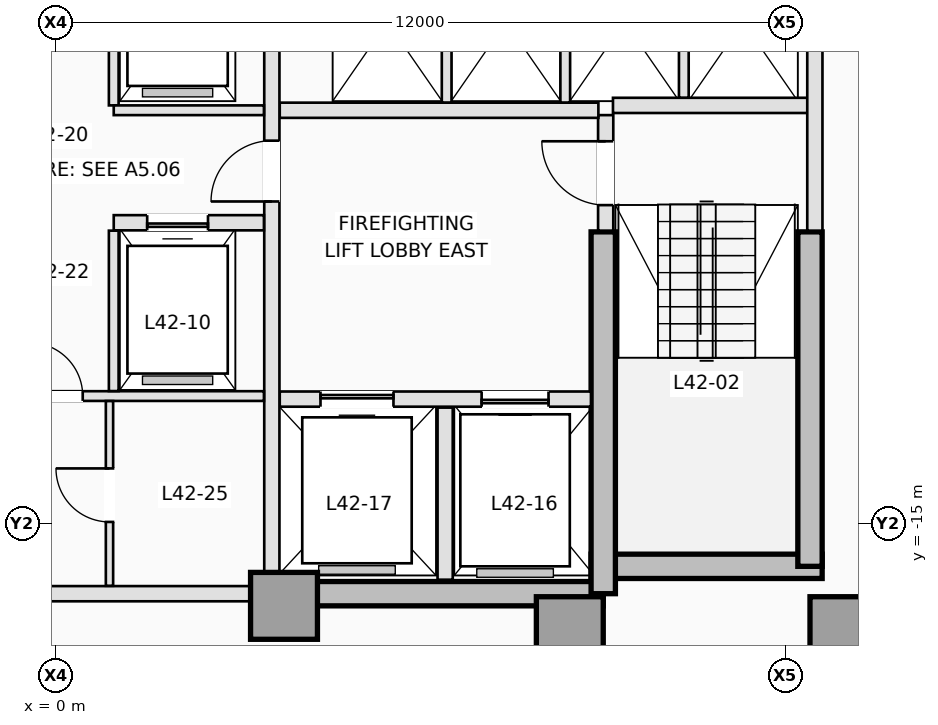
"""IFC4 building model, lengths in metres.
Left out: names, types, materials, properties, quantities, classifications, styles, units other than length and angle.
Written with IfcOpenShell. Run it as: python <this file> out.ifc"""

import sys

from ifc_helpers import new_model, si_unit, direction, frame, frame_2d, origin, origin_2d, place, context, subcontext, project, spatial, rectangle, extrude, element, fill, save


model = new_model("IFC4")
c1 = context("Model", 3, precision=1e-05, world=origin(), true_north=direction((0.0, 1.0)))
c2 = subcontext(c1, "Body", "Model", "MODEL_VIEW")
j1 = project(units=[si_unit("LENGTHUNIT", "METRE"), si_unit("PLANEANGLEUNIT", "RADIAN")], contexts=[c1])
p1 = place(None, origin())
s1 = spatial("IfcSite", under=j1, at=p1, CompositionType="ELEMENT")
p2 = place(p1, origin())
s2 = spatial("IfcBuilding", under=s1, at=p2, CompositionType="ELEMENT")
p3 = place(p2, frame((0.0, 0.0, 154.5)))
s3 = spatial("IfcBuildingStorey", under=s2, at=p3, CompositionType="ELEMENT", Elevation=154.5)
p4 = place(p3, frame((3.75, -16.15, 0.0), z_axis=(0.0, 0.0, 1.0), x_axis=(1.0, 0.0, 0.0)))
e1 = element("IfcWall", 1, at=p4, inside=s3, PredefinedType="SHEAR", context=c2, shape_type="SweptSolid", body=[
    extrude(rectangle(XDim=5.25, YDim=0.4, at=frame_2d((2.625, 0.0))), origin(), (0.0, 0.0, 1.0), 3.5),
])
p5 = place(p3, frame((8.8, -15.7, 0.0), z_axis=(0.0, 0.0, 1.0), x_axis=(1.0, 0.0, 0.0)))
e2 = element("IfcWall", 2, at=p5, inside=s3, PredefinedType="SHEAR", context=c2, shape_type="SweptSolid", body=[
    extrude(rectangle(XDim=3.8, YDim=0.4, at=frame_2d((1.9, 0.0))), origin(), (0.0, 0.0, 1.0), 3.5),
])
p6 = place(p3, frame((12.4, -15.7, 0.0), z_axis=(0.0, 0.0, 1.0), x_axis=(0.0, 1.0, 0.0)))
e3 = element("IfcWall", 3, at=p6, inside=s3, PredefinedType="SHEAR", context=c2, shape_type="SweptSolid", body=[
    extrude(rectangle(XDim=5.5, YDim=0.4, at=frame_2d((2.75, 0.0))), origin(), (0.0, 0.0, 1.0), 3.5),
])
p7 = place(p3, frame((9.0, -16.15, 0.0), z_axis=(0.0, 0.0, 1.0), x_axis=(0.0, 1.0, 0.0)))
e4 = element("IfcWall", 4, at=p7, inside=s3, PredefinedType="SHEAR", context=c2, shape_type="SweptSolid", body=[
    extrude(rectangle(XDim=5.95, YDim=0.4, at=frame_2d((2.975, 0.0))), origin(), (0.0, 0.0, 1.0), 3.5),
])
for number, where, z_axis, x_axis in (
    (5, (3.75, -16.35, 0.0), (0.0, 0.0, 1.0), (1.0, 0.0, 0.0)),
    (6, (8.45, -16.75, 0.0), (0.0, 0.0, 1.0), (1.0, 0.0, 0.0)),
    (7, (12.95, -16.75, 0.0), (0.0, 0.0, 1.0), (1.0, 0.0, 0.0)),
):
    element("IfcColumn", number, at=place(p3, frame(where, z_axis=z_axis, x_axis=x_axis)), inside=s3, PredefinedType="COLUMN", context=c2, shape_type="SweptSolid", body=[
        extrude(rectangle(XDim=1.1, YDim=1.1, at=origin_2d()), origin(), (0.0, 0.0, 1.0), 3.5),
    ])
p8 = place(p3, frame((9.04, -10.18, 0.0), z_axis=(0.0, 0.0, 1.0), x_axis=(0.0, 1.0, 0.0)))
e8 = element("IfcWall", 8, at=p8, inside=s3, PredefinedType="PARTITIONING", context=c2, shape_type="SweptSolid", body=[
    extrude(rectangle(XDim=1.9, YDim=0.25, at=frame_2d((0.95, 0.0))), origin(), (0.0, 0.0, 1.0), 3.25),
])
p9 = place(p8, frame((0.42, 0.0, 0.0)))
e9 = element("IfcOpeningElement", 9, at=p9, cuts=e8, PredefinedType="OPENING", context=c2, shape_type="SweptSolid", body=[
    extrude(rectangle(XDim=1.05, YDim=2.15, at=frame_2d((0.525, 1.075))), frame((0.0, 0.135, 0.0), z_axis=(0.0, -1.0, 0.0), x_axis=(1.0, 0.0, 0.0)), (0.0, 0.0, 1.0), 0.27),
])
p10 = place(p3, frame((9.16, -8.12, 0.0), z_axis=(0.0, 0.0, 1.0), x_axis=(1.0, 0.0, 0.0)))
e10 = element("IfcWall", 10, at=p10, inside=s3, PredefinedType="PARTITIONING", context=c2, shape_type="SweptSolid", body=[
    extrude(rectangle(XDim=3.22, YDim=0.25, at=frame_2d((1.61, 0.0))), origin(), (0.0, 0.0, 1.0), 3.25),
])
p11 = place(p3, frame((12.48, -10.18, 0.0), z_axis=(0.0, 0.0, 1.0), x_axis=(0.0, 1.0, 0.0)))
e11 = element("IfcWall", 11, at=p11, inside=s3, PredefinedType="PARTITIONING", context=c2, shape_type="SweptSolid", body=[
    extrude(rectangle(XDim=4.828, YDim=0.25, at=frame_2d((2.414, 0.0))), origin(), (0.0, 0.0, 1.0), 3.25),
])
p12 = place(p3, frame((3.68, -12.95, 0.0), z_axis=(0.0, 0.0, 1.0), x_axis=(1.0, 0.0, 0.0)))
e12 = element("IfcWall", 12, at=p12, inside=s3, PredefinedType="PARTITIONING", context=c2, shape_type="SweptSolid", body=[
    extrude(rectangle(XDim=5.118, YDim=0.25, at=frame_2d((2.559, 0.0))), origin(), (0.0, 0.0, 1.0), 3.25),
])
p13 = place(p12, frame((3.32, 0.0, 0.0)))
e13 = element("IfcOpeningElement", 13, at=p13, cuts=e12, PredefinedType="OPENING", context=c2, shape_type="SweptSolid", body=[
    extrude(rectangle(XDim=1.1, YDim=2.15, at=frame_2d((0.55, 1.075))), frame((0.0, 0.135, 0.0), z_axis=(0.0, -1.0, 0.0), x_axis=(1.0, 0.0, 0.0)), (0.0, 0.0, 1.0), 0.27),
])
p14 = place(p12, frame((0.67, 0.0, 0.0)))
e14 = element("IfcOpeningElement", 14, at=p14, cuts=e12, PredefinedType="OPENING", context=c2, shape_type="SweptSolid", body=[
    extrude(rectangle(XDim=1.2, YDim=2.15, at=frame_2d((0.6, 1.075))), frame((0.0, 0.135, 0.0), z_axis=(0.0, -1.0, 0.0), x_axis=(1.0, 0.0, 0.0)), (0.0, 0.0, 1.0), 0.27),
])
p15 = place(p3, frame((6.4, -15.92, 0.0), z_axis=(0.0, 0.0, 1.0), x_axis=(0.0, 1.0, 0.0)))
e15 = element("IfcWall", 15, at=p15, inside=s3, PredefinedType="PARTITIONING", context=c2, shape_type="SweptSolid", body=[
    extrude(rectangle(XDim=2.83, YDim=0.25, at=frame_2d((1.415, 0.0))), origin(), (0.0, 0.0, 1.0), 3.25),
])
p16 = place(p3, frame((3.68, -8.2, 0.0), z_axis=(0.0, 0.0, 1.0), x_axis=(1.0, 0.0, 0.0)))
e16 = element("IfcWall", 16, at=p16, inside=s3, PredefinedType="PARTITIONING", context=c2, shape_type="SweptSolid", body=[
    extrude(rectangle(XDim=5.24, YDim=0.25, at=frame_2d((2.62, 0.0))), origin(), (0.0, 0.0, 1.0), 3.25),
])
p17 = place(p3, frame((3.55, -15.798, 0.0), z_axis=(0.0, 0.0, 1.0), x_axis=(0.0, 1.0, 0.0)))
e17 = element("IfcWall", 17, at=p17, inside=s3, PredefinedType="PARTITIONING", context=c2, shape_type="SweptSolid", body=[
    extrude(rectangle(XDim=10.446, YDim=0.25, at=frame_2d((5.223, 0.0))), origin(), (0.0, 0.0, 1.0), 3.25),
])
p18 = place(p17, frame((6.098, 0.0, 0.0)))
e18 = element("IfcOpeningElement", 18, at=p18, cuts=e17, PredefinedType="OPENING", context=c2, shape_type="SweptSolid", body=[
    extrude(rectangle(XDim=1.0, YDim=2.15, at=frame_2d((0.5, 1.075))), frame((0.0, 0.135, 0.0), z_axis=(0.0, -1.0, 0.0), x_axis=(1.0, 0.0, 0.0)), (0.0, 0.0, 1.0), 0.27),
])
for number, where, z_axis, x_axis in (
    (19, (6.425, -8.073, 0.0), (0.0, 0.0, 1.0), (0.0, 1.0, 0.0)),
    (20, (8.375, -8.073, 0.0), (0.0, 0.0, 1.0), (0.0, 1.0, 0.0)),
):
    element("IfcWall", number, at=place(p3, frame(where, z_axis=z_axis, x_axis=x_axis)), inside=s3, PredefinedType="PARTITIONING", context=c2, shape_type="SweptSolid", body=[
        extrude(rectangle(XDim=2.733, YDim=0.16, at=frame_2d((1.366, 0.0))), origin(), (0.0, 0.0, 1.0), 3.25),
    ])
p19 = place(p3, frame((10.325, -7.993, 0.0), z_axis=(0.0, 0.0, 1.0), x_axis=(0.0, 1.0, 0.0)))
e21 = element("IfcWall", 21, at=p19, inside=s3, PredefinedType="PARTITIONING", context=c2, shape_type="SweptSolid", body=[
    extrude(rectangle(XDim=2.653, YDim=0.16, at=frame_2d((1.326, 0.0))), origin(), (0.0, 0.0, 1.0), 3.25),
])
p20 = place(p3, frame((-3.198, -16.15, 0.0), z_axis=(0.0, 0.0, 1.0), x_axis=(1.0, 0.0, 0.0)))
e22 = element("IfcWall", 22, at=p20, inside=s3, PredefinedType="PARTITIONING", context=c2, shape_type="SweptSolid", body=[
    extrude(rectangle(XDim=6.396, YDim=0.25, at=frame_2d((3.198, 0.0))), origin(), (0.0, 0.0, 1.0), 2.45),
])
p21 = place(p3, frame((0.95, -8.12, 0.0), z_axis=(0.0, 0.0, 1.0), x_axis=(0.0, 1.0, 0.0)))
e23 = element("IfcWall", 23, at=p21, inside=s3, PredefinedType="PARTITIONING", context=c2, shape_type="SweptSolid", body=[
    extrude(rectangle(XDim=2.78, YDim=0.16, at=frame_2d((1.39, 0.0))), origin(), (0.0, 0.0, 1.0), 3.25),
])
p22 = place(p3, frame((0.95, -8.2, 0.0), z_axis=(0.0, 0.0, 1.0), x_axis=(1.0, 0.0, 0.0)))
e24 = element("IfcWall", 24, at=p22, inside=s3, PredefinedType="PARTITIONING", context=c2, shape_type="SweptSolid", body=[
    extrude(rectangle(XDim=2.47, YDim=0.16, at=frame_2d((1.235, 0.0))), origin(), (0.0, 0.0, 1.0), 3.25),
])
p23 = place(p3, frame((0.95, -10.05, 0.0), z_axis=(0.0, 0.0, 1.0), x_axis=(1.0, 0.0, 0.0)))
e25 = element("IfcWall", 25, at=p23, inside=s3, PredefinedType="PARTITIONING", context=c2, shape_type="SweptSolid", body=[
    extrude(rectangle(XDim=2.47, YDim=0.25, at=frame_2d((1.235, 0.0))), origin(), (0.0, 0.0, 1.0), 3.25),
])
p24 = place(p23, frame((0.55, 0.0, 0.0)))
e26 = element("IfcOpeningElement", 26, at=p24, cuts=e25, PredefinedType="OPENING", context=c2, shape_type="SweptSolid", body=[
    extrude(rectangle(XDim=1.0, YDim=2.15, at=frame_2d((0.5, 1.075))), frame((0.0, 0.135, 0.0), z_axis=(0.0, -1.0, 0.0), x_axis=(1.0, 0.0, 0.0)), (0.0, 0.0, 1.0), 0.27),
])
p25 = place(p3, frame((-3.42, -12.9, 0.0), z_axis=(0.0, 0.0, 1.0), x_axis=(1.0, 0.0, 0.0)))
e27 = element("IfcWall", 27, at=p25, inside=s3, PredefinedType="PARTITIONING", context=c2, shape_type="SweptSolid", body=[
    extrude(rectangle(XDim=6.84, YDim=0.16, at=frame_2d((3.42, 0.0))), origin(), (0.0, 0.0, 1.0), 3.25),
])
p26 = place(p25, frame((2.98, 0.0, 0.0)))
e28 = element("IfcOpeningElement", 28, at=p26, cuts=e27, PredefinedType="OPENING", context=c2, shape_type="SweptSolid", body=[
    extrude(rectangle(XDim=0.88, YDim=2.12, at=frame_2d((0.44, 1.06))), frame((0.0, 0.09, 0.0), z_axis=(0.0, -1.0, 0.0), x_axis=(1.0, 0.0, 0.0)), (0.0, 0.0, 1.0), 0.18),
])
p27 = place(p3, frame((0.95, -12.818, 0.0), z_axis=(0.0, 0.0, 1.0), x_axis=(0.0, 1.0, 0.0)))
e29 = element("IfcWall", 29, at=p27, inside=s3, PredefinedType="PARTITIONING", context=c2, shape_type="SweptSolid", body=[
    extrude(rectangle(XDim=2.638, YDim=0.16, at=frame_2d((1.319, 0.0))), origin(), (0.0, 0.0, 1.0), 3.25),
])
p28 = place(p3, frame((0.88, -16.02, 0.0), z_axis=(0.0, 0.0, 1.0), x_axis=(0.0, 1.0, 0.0)))
e30 = element("IfcWall", 30, at=p28, inside=s3, PredefinedType="PARTITIONING", context=c2, shape_type="SweptSolid", body=[
    extrude(rectangle(XDim=3.038, YDim=0.12, at=frame_2d((1.519, 0.0))), origin(), (0.0, 0.0, 1.0), 3.25),
])
p29 = place(p28, frame((1.05, 0.0, 0.0)))
e31 = element("IfcOpeningElement", 31, at=p29, cuts=e30, PredefinedType="OPENING", context=c2, shape_type="SweptSolid", body=[
    extrude(rectangle(XDim=0.88, YDim=2.12, at=frame_2d((0.44, 1.06))), frame((0.0, 0.07, 0.0), z_axis=(0.0, -1.0, 0.0), x_axis=(1.0, 0.0, 0.0)), (0.0, 0.0, 1.0), 0.14),
])
p30 = place(p13, origin())
e32 = element("IfcDoor", 32, at=p30, inside=s3, OperationType="SLIDING_TO_RIGHT", PredefinedType="DOOR", context=c2, shape_type="SweptSolid", body=[
    extrude(rectangle(XDim=1.1, YDim=2.15, at=frame_2d((0.55, 1.075))), frame((0.0, 0.025, 0.0), z_axis=(0.0, -1.0, 0.0), x_axis=(1.0, 0.0, 0.0)), (0.0, 0.0, 1.0), 0.05),
])
fill(e13, e32)
p31 = place(p14, origin())
e33 = element("IfcDoor", 33, at=p31, inside=s3, OperationType="SLIDING_TO_LEFT", PredefinedType="DOOR", context=c2, shape_type="SweptSolid", body=[
    extrude(rectangle(XDim=1.2, YDim=2.15, at=frame_2d((0.6, 1.075))), frame((0.0, 0.025, 0.0), z_axis=(0.0, -1.0, 0.0), x_axis=(1.0, 0.0, 0.0)), (0.0, 0.0, 1.0), 0.05),
])
fill(e14, e33)
p32 = place(p24, origin())
e34 = element("IfcDoor", 34, at=p32, inside=s3, OperationType="SLIDING_TO_RIGHT", PredefinedType="DOOR", context=c2, shape_type="SweptSolid", body=[
    extrude(rectangle(XDim=1.0, YDim=2.15, at=frame_2d((0.5, 1.075))), frame((0.0, 0.025, 0.0), z_axis=(0.0, -1.0, 0.0), x_axis=(1.0, 0.0, 0.0)), (0.0, 0.0, 1.0), 0.05),
])
fill(e26, e34)
p33 = place(p9, origin())
e35 = element("IfcDoor", 35, at=p33, inside=s3, OperationType="SINGLE_SWING_RIGHT", PredefinedType="DOOR", context=c2, shape_type="SweptSolid", body=[
    extrude(rectangle(XDim=1.05, YDim=2.15, at=frame_2d((0.525, 1.075))), frame((0.0, 0.025, 0.0), z_axis=(0.0, -1.0, 0.0), x_axis=(1.0, 0.0, 0.0)), (0.0, 0.0, 1.0), 0.05),
])
fill(e9, e35)
p34 = place(p18, origin())
e36 = element("IfcDoor", 36, at=p34, inside=s3, OperationType="SINGLE_SWING_LEFT", PredefinedType="DOOR", context=c2, shape_type="SweptSolid", body=[
    extrude(rectangle(XDim=1.0, YDim=2.15, at=frame_2d((0.5, 1.075))), frame((0.0, 0.025, 0.0), z_axis=(0.0, -1.0, 0.0), x_axis=(1.0, 0.0, 0.0)), (0.0, 0.0, 1.0), 0.05),
])
fill(e18, e36)
p35 = place(p26, origin())
e37 = element("IfcDoor", 37, at=p35, inside=s3, OperationType="SINGLE_SWING_LEFT", PredefinedType="DOOR", context=c2, shape_type="SweptSolid", body=[
    extrude(rectangle(XDim=0.88, YDim=2.12, at=frame_2d((0.44, 1.06))), frame((0.0, 0.025, 0.0), z_axis=(0.0, -1.0, 0.0), x_axis=(1.0, 0.0, 0.0)), (0.0, 0.0, 1.0), 0.05),
])
fill(e28, e37)
p36 = place(p29, origin())
e38 = element("IfcDoor", 38, at=p36, inside=s3, OperationType="SINGLE_SWING_RIGHT", PredefinedType="DOOR", context=c2, shape_type="SweptSolid", body=[
    extrude(rectangle(XDim=0.88, YDim=2.12, at=frame_2d((0.44, 1.06))), frame((0.0, 0.025, 0.0), z_axis=(0.0, -1.0, 0.0), x_axis=(1.0, 0.0, 0.0)), (0.0, 0.0, 1.0), 0.05),
])
fill(e31, e38)
save(model, sys.argv[1])
